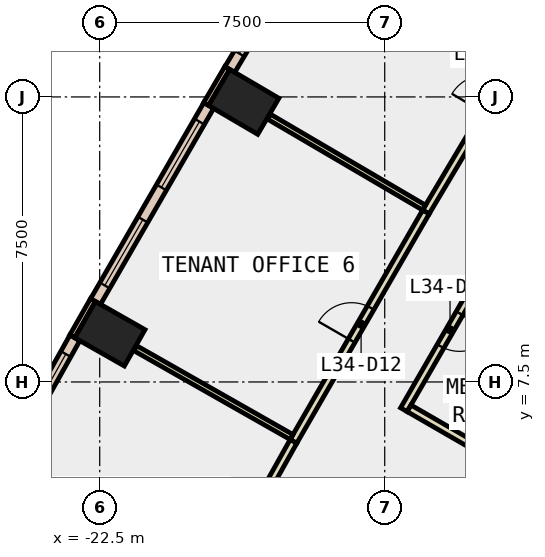
"""IFC4 building model, lengths in metres.
Left out: names, types, materials, properties, quantities, classifications, styles, units other than length and angle.
Written with IfcOpenShell. Run it as: python <this file> out.ifc"""

import sys

from ifc_helpers import new_model, si_unit, direction, frame, frame_2d, origin, origin_2d, place, context, subcontext, project, spatial, polyline, rectangle, outline, extrude, element, fill, save


model = new_model("IFC4")
c1 = context("Model", 3, precision=1e-05, world=origin(), true_north=direction((0.0, 1.0)))
c2 = subcontext(c1, "Body", "Model", "MODEL_VIEW")
j1 = project(units=[si_unit("LENGTHUNIT", "METRE"), si_unit("PLANEANGLEUNIT", "RADIAN")], contexts=[c1])
p1 = place(None, origin())
s1 = spatial("IfcSite", under=j1, at=p1, CompositionType="ELEMENT")
p2 = place(p1, origin())
s2 = spatial("IfcBuilding", under=s1, at=p2, CompositionType="ELEMENT")
p3 = place(p2, frame((0.0, 0.0, 155.0)))
s3 = spatial("IfcBuildingStorey", under=s2, at=p3, CompositionType="ELEMENT", Elevation=155.0)
for number, where, z_axis, x_axis in (
    (1, (-18.71, 14.87, -0.4), (0.0, 0.0, 1.0), (0.506, 0.863, 0.0)),
    (2, (-22.232, 8.769, -0.4), (0.0, 0.0, 1.0), (0.494, 0.869, 0.0)),
):
    element("IfcColumn", number, at=place(p3, frame(where, z_axis=z_axis, x_axis=x_axis)), inside=s3, PredefinedType="COLUMN", context=c2, shape_type="SweptSolid", body=[
        extrude(rectangle(XDim=1.1, YDim=1.5, at=origin_2d()), origin(), (0.0, 0.0, 1.0), 4.2),
    ])
p4 = place(p3, frame((0.0, 0.0, 3.6)))
e3 = element("IfcWall", 3, at=p4, inside=s3, PredefinedType="SHEAR", context=c2, shape_type="SweptSolid", body=[
    extrude(outline(polyline([(-13.267, 3.52), (-12.575, 3.12), (-11.575, 4.852), (-12.267, 5.252), (-13.267, 3.52)])), origin(), (0.0, 0.0, 1.0), 0.2),
])
p5 = place(p3, frame((-19.143, 15.761, 0.0), z_axis=(0.0, 0.0, 1.0), x_axis=(-0.506505715302, -0.862236603472, 0.0)))
e4 = element("IfcWall", 4, at=p5, inside=s3, PredefinedType="STANDARD", context=c2, shape_type="SweptSolid", body=[
    extrude(rectangle(XDim=1.099, YDim=0.15, at=frame_2d((0.55, 0.0))), origin(), (0.0, 0.0, 1.0), 3.8),
])
p6 = place(p3, frame((-22.678, 9.655, 0.0), z_axis=(0.0, 0.0, 1.0), x_axis=(-0.494512685492, -0.869170411305, 0.0)))
e5 = element("IfcWall", 5, at=p6, inside=s3, PredefinedType="STANDARD", context=c2, shape_type="SweptSolid", body=[
    extrude(rectangle(XDim=1.1, YDim=0.15, at=frame_2d((0.55, 0.0))), origin(), (0.0, 0.0, 1.0), 3.8),
])
p7 = place(p3, frame((-16.029, 20.84, 0.0), z_axis=(0.0, 0.0, 1.0), x_axis=(-0.511455040009, -0.859310038374, 0.0)))
e6 = element("IfcWall", 6, at=p7, inside=s3, PredefinedType="STANDARD", context=c2, shape_type="SweptSolid", body=[
    extrude(rectangle(XDim=5.957, YDim=0.3, at=frame_2d((2.979, 0.0))), origin(), (0.0, 0.0, 1.0), 3.8),
])
p8 = place(p7, frame((0.489, 0.0, 0.9)))
e7 = element("IfcOpeningElement", 7, at=p8, cuts=e6, PredefinedType="OPENING", context=c2, shape_type="SweptSolid", body=[
    extrude(rectangle(XDim=2.0, YDim=2.6, at=frame_2d((1.0, 1.3))), frame((0.0, 0.16, 0.0), z_axis=(0.0, -1.0, 0.0), x_axis=(1.0, 0.0, 0.0)), (0.0, 0.0, 1.0), 0.32),
])
p9 = place(p7, frame((3.468, 0.0, 0.9)))
e8 = element("IfcOpeningElement", 8, at=p9, cuts=e6, PredefinedType="OPENING", context=c2, shape_type="SweptSolid", body=[
    extrude(rectangle(XDim=2.0, YDim=2.6, at=frame_2d((1.0, 1.3))), frame((0.0, 0.16, 0.0), z_axis=(0.0, -1.0, 0.0), x_axis=(1.0, 0.0, 0.0)), (0.0, 0.0, 1.0), 0.32),
])
p10 = place(p3, frame((-19.631, 14.774, 0.0), z_axis=(0.0, 0.0, 1.0), x_axis=(-0.500061823953, -0.865989706766, 0.0)))
e9 = element("IfcWall", 9, at=p10, inside=s3, PredefinedType="STANDARD", context=c2, shape_type="SweptSolid", body=[
    extrude(rectangle(XDim=5.957, YDim=0.3, at=frame_2d((2.979, 0.0))), origin(), (0.0, 0.0, 1.0), 3.8),
])
p11 = place(p10, frame((0.489, 0.0, 0.9)))
e10 = element("IfcOpeningElement", 10, at=p11, cuts=e9, PredefinedType="OPENING", context=c2, shape_type="SweptSolid", body=[
    extrude(rectangle(XDim=2.0, YDim=2.6, at=frame_2d((1.0, 1.3))), frame((0.0, 0.16, 0.0), z_axis=(0.0, -1.0, 0.0), x_axis=(1.0, 0.0, 0.0)), (0.0, 0.0, 1.0), 0.32),
])
p12 = place(p10, frame((3.468, 0.0, 0.9)))
e11 = element("IfcOpeningElement", 11, at=p12, cuts=e9, PredefinedType="OPENING", context=c2, shape_type="SweptSolid", body=[
    extrude(rectangle(XDim=2.0, YDim=2.6, at=frame_2d((1.0, 1.3))), frame((0.0, 0.16, 0.0), z_axis=(0.0, -1.0, 0.0), x_axis=(1.0, 0.0, 0.0)), (0.0, 0.0, 1.0), 0.32),
])
p13 = place(p3, frame((-23.153, 8.661, 0.0), z_axis=(0.0, 0.0, 1.0), x_axis=(-0.488354983501, -0.872645065356, 0.0)))
e12 = element("IfcWall", 12, at=p13, inside=s3, PredefinedType="STANDARD", context=c2, shape_type="SweptSolid", body=[
    extrude(rectangle(XDim=5.957, YDim=0.3, at=frame_2d((2.978, 0.0))), origin(), (0.0, 0.0, 1.0), 3.8),
])
p14 = place(p13, frame((0.489, 0.0, 0.9)))
e13 = element("IfcOpeningElement", 13, at=p14, cuts=e12, PredefinedType="OPENING", context=c2, shape_type="SweptSolid", body=[
    extrude(rectangle(XDim=2.0, YDim=2.6, at=frame_2d((1.0, 1.3))), frame((0.0, 0.16, 0.0), z_axis=(0.0, -1.0, 0.0), x_axis=(1.0, 0.0, 0.0)), (0.0, 0.0, 1.0), 0.32),
])
p15 = place(p13, frame((3.467, 0.0, 0.9)))
e14 = element("IfcOpeningElement", 14, at=p15, cuts=e12, PredefinedType="OPENING", context=c2, shape_type="SweptSolid", body=[
    extrude(rectangle(XDim=2.0, YDim=2.6, at=frame_2d((1.0, 1.3))), frame((0.0, 0.16, 0.0), z_axis=(0.0, -1.0, 0.0), x_axis=(1.0, 0.0, 0.0)), (0.0, 0.0, 1.0), 0.32),
])
p16 = place(p3, frame((-12.067, 10.975, 0.0), z_axis=(0.0, 0.0, 1.0), x_axis=(-0.500215616273, -0.865900881878, 0.0)))
e15 = element("IfcWall", 15, at=p16, inside=s3, PredefinedType="PARTITIONING", context=c2, shape_type="SweptSolid", body=[
    extrude(rectangle(XDim=4.856, YDim=0.2, at=frame_2d((2.428, 0.0))), origin(), (0.0, 0.0, 1.0), 3.8),
])
p17 = place(p16, frame((1.928, 0.0, 0.0)))
e16 = element("IfcOpeningElement", 16, at=p17, cuts=e15, PredefinedType="OPENING", context=c2, shape_type="SweptSolid", body=[
    extrude(rectangle(XDim=1.0, YDim=2.1, at=frame_2d((0.5, 1.05))), frame((0.0, 0.11, 0.0), z_axis=(0.0, -1.0, 0.0), x_axis=(1.0, 0.0, 0.0)), (0.0, 0.0, 1.0), 0.22),
])
p18 = place(p3, frame((-14.359, 6.806, 0.0), z_axis=(0.0, 0.0, 1.0), x_axis=(0.866155875717, -0.499773947861, 0.0)))
e17 = element("IfcWall", 17, at=p18, inside=s3, PredefinedType="PARTITIONING", context=c2, shape_type="SweptSolid", body=[
    extrude(rectangle(XDim=2.189, YDim=0.2, at=frame_2d((1.094, 0.0))), origin(), (0.0, 0.0, 1.0), 3.8),
])
p19 = place(p3, frame((-13.917, 11.973, 0.0), z_axis=(0.0, 0.0, 1.0), x_axis=(0.511455840413, 0.859309561978, 0.0)))
e18 = element("IfcWall", 18, at=p19, inside=s3, PredefinedType="PARTITIONING", context=c2, shape_type="SweptSolid", body=[
    extrude(rectangle(XDim=7.047, YDim=0.2, at=frame_2d((3.523, 0.0))), origin(), (0.0, 0.0, 1.0), 3.8),
])
p20 = place(p19, frame((3.023, 0.0, 0.0)))
e19 = element("IfcOpeningElement", 19, at=p20, cuts=e18, PredefinedType="OPENING", context=c2, shape_type="SweptSolid", body=[
    extrude(rectangle(XDim=1.0, YDim=2.1, at=frame_2d((0.5, 1.05))), frame((0.0, 0.11, 0.0), z_axis=(0.0, -1.0, 0.0), x_axis=(1.0, 0.0, 0.0)), (0.0, 0.0, 1.0), 0.22),
])
p21 = place(p3, frame((-17.402, 5.936, 0.0), z_axis=(0.0, 0.0, 1.0), x_axis=(0.500135788517, 0.865946992052, 0.0)))
e20 = element("IfcWall", 20, at=p21, inside=s3, PredefinedType="PARTITIONING", context=c2, shape_type="SweptSolid", body=[
    extrude(rectangle(XDim=6.97, YDim=0.2, at=frame_2d((3.485, 0.0))), origin(), (0.0, 0.0, 1.0), 3.8),
])
p22 = place(p21, frame((3.06, 0.0, 0.0)))
e21 = element("IfcOpeningElement", 21, at=p22, cuts=e20, PredefinedType="OPENING", context=c2, shape_type="SweptSolid", body=[
    extrude(rectangle(XDim=1.0, YDim=2.1, at=frame_2d((0.5, 1.05))), frame((0.0, 0.11, 0.0), z_axis=(0.0, -1.0, 0.0), x_axis=(1.0, 0.0, 0.0)), (0.0, 0.0, 1.0), 0.22),
])
p23 = place(p3, frame((-20.769, -0.082, 0.0), z_axis=(0.0, 0.0, 1.0), x_axis=(0.488387759141, 0.872626722443, 0.0)))
e22 = element("IfcWall", 22, at=p23, inside=s3, PredefinedType="PARTITIONING", context=c2, shape_type="SweptSolid", body=[
    extrude(rectangle(XDim=6.896, YDim=0.2, at=frame_2d((3.448, 0.0))), origin(), (0.0, 0.0, 1.0), 3.8),
])
p24 = place(p3, frame((-13.965, 12.088, 0.0), z_axis=(0.0, 0.0, 1.0), x_axis=(-0.862617990649, 0.50585591052, 0.0)))
e23 = element("IfcWall", 23, at=p24, inside=s3, PredefinedType="PARTITIONING", context=c2, shape_type="SweptSolid", body=[
    extrude(rectangle(XDim=4.731, YDim=0.15, at=frame_2d((2.365, 0.0))), origin(), (0.0, 0.0, 1.0), 3.8),
])
p25 = place(p3, frame((-17.451, 6.051, 0.0), z_axis=(0.0, 0.0, 1.0), x_axis=(-0.869409691741, 0.494091882049, 0.0)))
e24 = element("IfcWall", 24, at=p25, inside=s3, PredefinedType="PARTITIONING", context=c2, shape_type="SweptSolid", body=[
    extrude(rectangle(XDim=4.73, YDim=0.15, at=frame_2d((2.365, 0.0))), origin(), (0.0, 0.0, 1.0), 3.8),
])
p26 = place(p3, frame((-12.18, 5.202, 0.0), z_axis=(0.0, 0.0, 1.0), x_axis=(-0.50002537861, -0.866010750942, 0.0)))
e25 = element("IfcWall", 25, at=p26, inside=s3, PredefinedType="PARTITIONING", context=c2, shape_type="SweptSolid", body=[
    extrude(rectangle(XDim=2.0, YDim=0.2, at=frame_2d((1.0, 0.0))), origin(), (0.0, 0.0, 1.0), 2.4),
])
p27 = place(p26, frame((0.19, 0.0, 0.0)))
e26 = element("IfcOpeningElement", 26, at=p27, cuts=e25, PredefinedType="OPENING", context=c2, shape_type="SweptSolid", body=[
    extrude(rectangle(XDim=1.8, YDim=2.1, at=frame_2d((0.9, 1.05))), frame((0.0, 0.11, 0.0), z_axis=(0.0, -1.0, 0.0), x_axis=(1.0, 0.0, 0.0)), (0.0, 0.0, 1.0), 0.22),
])
p28 = place(p9, origin())
e27 = element("IfcWindow", 27, at=p28, inside=s3, PartitioningType="SINGLE_PANEL", PredefinedType="WINDOW", context=c2, shape_type="SweptSolid", body=[
    extrude(rectangle(XDim=2.0, YDim=2.6, at=frame_2d((1.0, 1.3))), frame((0.0, 0.03, 0.0), z_axis=(0.0, -1.0, 0.0), x_axis=(1.0, 0.0, 0.0)), (0.0, 0.0, 1.0), 0.06),
])
fill(e8, e27)
p29 = place(p11, origin())
e28 = element("IfcWindow", 28, at=p29, inside=s3, PartitioningType="SINGLE_PANEL", PredefinedType="WINDOW", context=c2, shape_type="SweptSolid", body=[
    extrude(rectangle(XDim=2.0, YDim=2.6, at=frame_2d((1.0, 1.3))), frame((0.0, 0.03, 0.0), z_axis=(0.0, -1.0, 0.0), x_axis=(1.0, 0.0, 0.0)), (0.0, 0.0, 1.0), 0.06),
])
fill(e10, e28)
p30 = place(p12, origin())
e29 = element("IfcWindow", 29, at=p30, inside=s3, PartitioningType="SINGLE_PANEL", PredefinedType="WINDOW", context=c2, shape_type="SweptSolid", body=[
    extrude(rectangle(XDim=2.0, YDim=2.6, at=frame_2d((1.0, 1.3))), frame((0.0, 0.03, 0.0), z_axis=(0.0, -1.0, 0.0), x_axis=(1.0, 0.0, 0.0)), (0.0, 0.0, 1.0), 0.06),
])
fill(e11, e29)
p31 = place(p14, origin())
e30 = element("IfcWindow", 30, at=p31, inside=s3, PartitioningType="SINGLE_PANEL", PredefinedType="WINDOW", context=c2, shape_type="SweptSolid", body=[
    extrude(rectangle(XDim=2.0, YDim=2.6, at=frame_2d((1.0, 1.3))), frame((0.0, 0.03, 0.0), z_axis=(0.0, -1.0, 0.0), x_axis=(1.0, 0.0, 0.0)), (0.0, 0.0, 1.0), 0.06),
])
fill(e13, e30)
p32 = place(p22, origin())
e31 = element("IfcDoor", 31, at=p32, inside=s3, OperationType="SINGLE_SWING_LEFT", PredefinedType="DOOR", context=c2, shape_type="SweptSolid", body=[
    extrude(rectangle(XDim=1.0, YDim=2.1, at=frame_2d((0.5, 1.05))), frame((0.0, 0.025, 0.0), z_axis=(0.0, -1.0, 0.0), x_axis=(1.0, 0.0, 0.0)), (0.0, 0.0, 1.0), 0.05),
])
fill(e21, e31)
p33 = place(p17, origin())
e32 = element("IfcDoor", 32, at=p33, inside=s3, OperationType="SINGLE_SWING_LEFT", PredefinedType="DOOR", context=c2, shape_type="SweptSolid", body=[
    extrude(rectangle(XDim=1.0, YDim=2.1, at=frame_2d((0.5, 1.05))), frame((0.0, 0.025, 0.0), z_axis=(0.0, -1.0, 0.0), x_axis=(1.0, 0.0, 0.0)), (0.0, 0.0, 1.0), 0.05),
])
fill(e16, e32)
p34 = place(p27, origin())
e33 = element("IfcDoor", 33, at=p34, inside=s3, OperationType="DOUBLE_DOOR_SINGLE_SWING", PredefinedType="DOOR", context=c2, shape_type="SweptSolid", body=[
    extrude(rectangle(XDim=1.8, YDim=2.1, at=frame_2d((0.9, 1.05))), frame((0.0, 0.025, 0.0), z_axis=(0.0, -1.0, 0.0), x_axis=(1.0, 0.0, 0.0)), (0.0, 0.0, 1.0), 0.05),
])
fill(e26, e33)
save(model, sys.argv[1])
